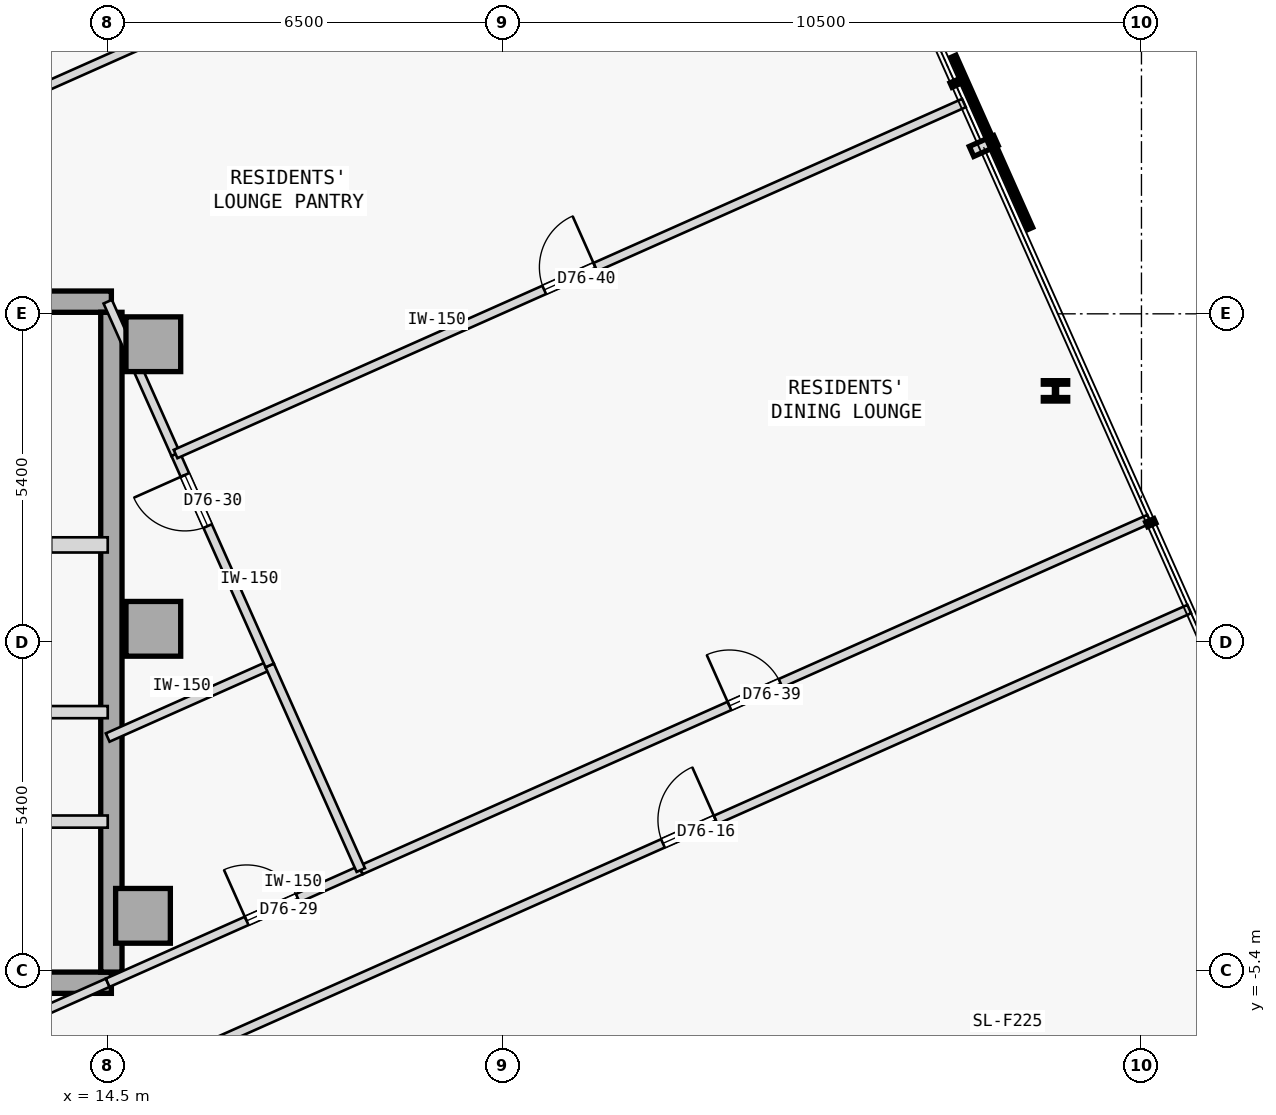
"""IFC4 building model, lengths in metres.
Left out: names, types, materials, properties, quantities, classifications, styles, units other than length and angle.
Written with IfcOpenShell. Run it as: python <this file> out.ifc"""

import sys

from ifc_helpers import new_model, si_unit, direction, frame, frame_2d, origin, origin_2d, place, context, subcontext, project, spatial, rectangle, i_section, extrude, element, fill, save


model = new_model("IFC4")
c1 = context("Model", 3, precision=1e-05, world=origin(), true_north=direction((0.0, 1.0)))
c2 = subcontext(c1, "Body", "Model", "MODEL_VIEW")
j1 = project(units=[si_unit("LENGTHUNIT", "METRE"), si_unit("PLANEANGLEUNIT", "RADIAN")], contexts=[c1])
p1 = place(None, origin())
s1 = spatial("IfcSite", under=j1, at=p1, CompositionType="ELEMENT")
p2 = place(p1, origin())
s2 = spatial("IfcBuilding", under=s1, at=p2, CompositionType="ELEMENT")
p3 = place(p2, frame((0.0, 0.0, 285.25)))
s3 = spatial("IfcBuildingStorey", under=s2, at=p3, CompositionType="ELEMENT", Elevation=285.25)
for number, where, z_axis, x_axis in (
    (1, (15.25, 4.9, 0.0), (0.0, 0.0, 1.0), (1.0, 0.0, 0.0)),
    (2, (15.25, 0.22, 0.0), (0.0, 0.0, 1.0), (1.0, 0.0, 0.0)),
    (3, (15.08, -4.5, 0.0), (0.0, 0.0, 1.0), (1.0, 0.0, 0.0)),
):
    element("IfcColumn", number, at=place(p3, frame(where, z_axis=z_axis, x_axis=x_axis)), inside=s3, PredefinedType="COLUMN", context=c2, shape_type="SweptSolid", body=[
        extrude(rectangle(XDim=0.9, YDim=0.9, at=origin_2d()), origin(), (0.0, 0.0, 1.0), 3.35),
    ])
p4 = place(p3, frame((3.15, 5.6, 0.0), z_axis=(0.0, 0.0, 1.0), x_axis=(1.0, 0.0, 0.0)))
e4 = element("IfcWall", 4, at=p4, inside=s3, PredefinedType="SHEAR", context=c2, shape_type="SweptSolid", body=[
    extrude(rectangle(XDim=11.41, YDim=0.35, at=frame_2d((5.705, 0.0))), origin(), (0.0, 0.0, 1.0), 3.125),
])
p5 = place(p3, frame((3.7, -5.6, 0.0), z_axis=(0.0, 0.0, 1.0), x_axis=(1.0, 0.0, 0.0)))
e5 = element("IfcWall", 5, at=p5, inside=s3, PredefinedType="SHEAR", context=c2, shape_type="SweptSolid", body=[
    extrude(rectangle(XDim=10.86, YDim=0.35, at=frame_2d((5.43, 0.0))), origin(), (0.0, 0.0, 1.0), 3.125),
])
p6 = place(p3, frame((14.56, -5.425, 0.0), z_axis=(0.0, 0.0, 1.0), x_axis=(0.0, 1.0, 0.0)))
e6 = element("IfcWall", 6, at=p6, inside=s3, PredefinedType="SHEAR", context=c2, shape_type="SweptSolid", body=[
    extrude(rectangle(XDim=10.85, YDim=0.35, at=frame_2d((5.425, 0.0))), origin(), (0.0, 0.0, 1.0), 3.125),
])
p7 = place(p3, frame((30.086, 4.133, 0.0), z_axis=(0.0, 0.0, 1.0), x_axis=(1.0, 0.0, 0.0)))
e7 = element("IfcColumn", 7, at=p7, inside=s3, PredefinedType="COLUMN", context=c2, shape_type="SweptSolid", body=[
    extrude(i_section(OverallWidth=0.401, OverallDepth=0.335, WebThickness=0.036, FlangeThickness=0.058, FilletRadius=0.015, at=origin_2d()), origin(), (0.0, 0.0, 1.0), 3.35),
])
p8 = place(p3, frame((10.9, 1.6, 0.0), z_axis=(0.0, 0.0, 1.0), x_axis=(1.0, 0.0, 0.0)))
e8 = element("IfcWall", 8, at=p8, inside=s3, PredefinedType="STANDARD", context=c2, shape_type="SweptSolid", body=[
    extrude(rectangle(XDim=3.6, YDim=0.25, at=frame_2d((1.8, 0.0))), origin(), (0.0, 0.0, 1.0), 3.125),
])
p9 = place(p8, frame((1.62, 0.0, 0.0)))
e9 = element("IfcOpeningElement", 9, at=p9, cuts=e8, PredefinedType="OPENING", context=c2, shape_type="SweptSolid", body=[
    extrude(rectangle(XDim=1.05, YDim=2.15, at=frame_2d((0.525, 1.075))), frame((0.0, 0.135, 0.0), z_axis=(0.0, -1.0, 0.0), x_axis=(1.0, 0.0, 0.0)), (0.0, 0.0, 1.0), 0.27),
])
p10 = place(p3, frame((11.55, -1.15, 0.0), z_axis=(0.0, 0.0, 1.0), x_axis=(1.0, 0.0, 0.0)))
e10 = element("IfcWall", 10, at=p10, inside=s3, PredefinedType="STANDARD", context=c2, shape_type="SweptSolid", body=[
    extrude(rectangle(XDim=2.95, YDim=0.2, at=frame_2d((1.475, 0.0))), origin(), (0.0, 0.0, 1.0), 3.125),
])
p11 = place(p10, frame((0.75, 0.0, 0.0)))
e11 = element("IfcOpeningElement", 11, at=p11, cuts=e10, PredefinedType="OPENING", context=c2, shape_type="SweptSolid", body=[
    extrude(rectangle(XDim=1.05, YDim=2.18, at=frame_2d((0.525, 1.09))), frame((0.0, 0.11, 0.0), z_axis=(0.0, -1.0, 0.0), x_axis=(1.0, 0.0, 0.0)), (0.0, 0.0, 1.0), 0.22),
])
p12 = place(p3, frame((3.7, -2.95, 0.0), z_axis=(0.0, 0.0, 1.0), x_axis=(1.0, 0.0, 0.0)))
e12 = element("IfcWall", 12, at=p12, inside=s3, PredefinedType="STANDARD", context=c2, shape_type="SweptSolid", body=[
    extrude(rectangle(XDim=10.8, YDim=0.2, at=frame_2d((5.4, 0.0))), origin(), (0.0, 0.0, 1.0), 3.125),
])
p13 = place(p12, frame((0.53, 0.0, 0.0)))
e13 = element("IfcOpeningElement", 13, at=p13, cuts=e12, PredefinedType="OPENING", context=c2, shape_type="SweptSolid", body=[
    extrude(rectangle(XDim=1.1, YDim=2.15, at=frame_2d((0.55, 1.075))), frame((0.0, 0.11, 0.0), z_axis=(0.0, -1.0, 0.0), x_axis=(1.0, 0.0, 0.0)), (0.0, 0.0, 1.0), 0.22),
])
p14 = place(p12, frame((6.02, 0.0, 0.0)))
e14 = element("IfcOpeningElement", 14, at=p14, cuts=e12, PredefinedType="OPENING", context=c2, shape_type="SweptSolid", body=[
    extrude(rectangle(XDim=0.92, YDim=2.15, at=frame_2d((0.46, 1.075))), frame((0.0, 0.11, 0.0), z_axis=(0.0, -1.0, 0.0), x_axis=(1.0, 0.0, 0.0)), (0.0, 0.0, 1.0), 0.22),
])
p15 = place(p3, frame((15.843, -6.776, 0.0), z_axis=(0.0, 0.0, 1.0), x_axis=(0.913541183414, 0.406746243015, 0.0)))
e15 = element("IfcWall", 15, at=p15, inside=s3, PredefinedType="PARTITIONING", context=c2, shape_type="SweptSolid", body=[
    extrude(rectangle(XDim=17.999, YDim=0.15, at=frame_2d((9.0, 0.0))), origin(), (0.0, 0.0, 1.0), 3.125),
])
p16 = place(p15, frame((8.524, 0.0, 0.0)))
e16 = element("IfcOpeningElement", 16, at=p16, cuts=e15, PredefinedType="OPENING", context=c2, shape_type="SweptSolid", body=[
    extrude(rectangle(XDim=0.95, YDim=2.15, at=frame_2d((0.475, 1.075))), frame((0.0, 0.085, 0.0), z_axis=(0.0, -1.0, 0.0), x_axis=(1.0, 0.0, 0.0)), (0.0, 0.0, 1.0), 0.17),
])
p17 = place(p3, frame((7.588, -8.677, 0.0), z_axis=(0.0, 0.0, 1.0), x_axis=(0.913555880467, 0.406713232221, 0.0)))
e17 = element("IfcWall", 17, at=p17, inside=s3, PredefinedType="PARTITIONING", context=c2, shape_type="SweptSolid", body=[
    extrude(rectangle(XDim=7.566, YDim=0.15, at=frame_2d((3.783, 0.0))), origin(), (0.0, 0.0, 1.0), 3.125),
])
p18 = place(p17, frame((1.205, 0.0, 0.0)))
e18 = element("IfcOpeningElement", 18, at=p18, cuts=e17, PredefinedType="OPENING", context=c2, shape_type="SweptSolid", body=[
    extrude(rectangle(XDim=0.92, YDim=2.15, at=frame_2d((0.46, 1.075))), frame((0.0, 0.085, 0.0), z_axis=(0.0, -1.0, 0.0), x_axis=(1.0, 0.0, 0.0)), (0.0, 0.0, 1.0), 0.17),
])
p19 = place(p3, frame((14.5, -5.6, 0.0), z_axis=(0.0, 0.0, 1.0), x_axis=(0.913550607208, 0.406725076766, 0.0)))
e19 = element("IfcWall", 19, at=p19, inside=s3, PredefinedType="PARTITIONING", context=c2, shape_type="SweptSolid", body=[
    extrude(rectangle(XDim=4.556, YDim=0.15, at=frame_2d((2.278, 0.0))), origin(), (0.0, 0.0, 1.0), 3.125),
])
p20 = place(p19, frame((2.501, 0.0, 0.0)))
e20 = element("IfcOpeningElement", 20, at=p20, cuts=e19, PredefinedType="OPENING", context=c2, shape_type="SweptSolid", body=[
    extrude(rectangle(XDim=0.92, YDim=2.15, at=frame_2d((0.46, 1.075))), frame((0.0, 0.085, 0.0), z_axis=(0.0, -1.0, 0.0), x_axis=(1.0, 0.0, 0.0)), (0.0, 0.0, 1.0), 0.17),
])
p21 = place(p3, frame((18.662, -3.747, 0.0), z_axis=(0.0, 0.0, 1.0), x_axis=(0.913544622417, 0.406738519018, 0.0)))
e21 = element("IfcWall", 21, at=p21, inside=s3, PredefinedType="PARTITIONING", context=c2, shape_type="SweptSolid", body=[
    extrude(rectangle(XDim=14.192, YDim=0.15, at=frame_2d((7.096, 0.0))), origin(), (0.0, 0.0, 1.0), 3.125),
])
p22 = place(p21, frame((6.636, 0.0, 0.0)))
e22 = element("IfcOpeningElement", 22, at=p22, cuts=e21, PredefinedType="OPENING", context=c2, shape_type="SweptSolid", body=[
    extrude(rectangle(XDim=0.92, YDim=2.15, at=frame_2d((0.46, 1.075))), frame((0.0, 0.085, 0.0), z_axis=(0.0, -1.0, 0.0), x_axis=(1.0, 0.0, 0.0)), (0.0, 0.0, 1.0), 0.17),
])
p23 = place(p3, frame((14.5, -1.568, 0.0), z_axis=(0.0, 0.0, 1.0), x_axis=(0.91354204122, 0.4067443164, 0.0)))
e23 = element("IfcWall", 23, at=p23, inside=s3, PredefinedType="PARTITIONING", context=c2, shape_type="SweptSolid", body=[
    extrude(rectangle(XDim=2.916, YDim=0.15, at=frame_2d((1.458, 0.0))), origin(), (0.0, 0.0, 1.0), 3.125),
])
p24 = place(p3, frame((18.662, -3.747, 0.0), z_axis=(0.0, 0.0, 1.0), x_axis=(-0.406740920471, 0.913543553212, 0.0)))
e24 = element("IfcWall", 24, at=p24, inside=s3, PredefinedType="PARTITIONING", context=c2, shape_type="SweptSolid", body=[
    extrude(rectangle(XDim=3.684, YDim=0.15, at=frame_2d((1.842, 0.0))), origin(), (0.0, 0.0, 1.0), 3.125),
])
p25 = place(p3, frame((17.163, -0.382, 0.0), z_axis=(0.0, 0.0, 1.0), x_axis=(-0.406727752939, 0.913549415735, 0.0)))
e25 = element("IfcWall", 25, at=p25, inside=s3, PredefinedType="PARTITIONING", context=c2, shape_type="SweptSolid", body=[
    extrude(rectangle(XDim=3.805, YDim=0.15, at=frame_2d((1.902, 0.0))), origin(), (0.0, 0.0, 1.0), 3.125),
])
p26 = place(p25, frame((2.508, 0.0, 0.0)))
e26 = element("IfcOpeningElement", 26, at=p26, cuts=e25, PredefinedType="OPENING", context=c2, shape_type="SweptSolid", body=[
    extrude(rectangle(XDim=0.92, YDim=2.15, at=frame_2d((0.46, 1.075))), frame((0.0, 0.085, 0.0), z_axis=(0.0, -1.0, 0.0), x_axis=(1.0, 0.0, 0.0)), (0.0, 0.0, 1.0), 0.17),
])
p27 = place(p3, frame((15.616, 3.094, 0.0), z_axis=(0.0, 0.0, 1.0), x_axis=(-0.406782551453, 0.913525016534, 0.0)))
e27 = element("IfcWall", 27, at=p27, inside=s3, PredefinedType="PARTITIONING", context=c2, shape_type="SweptSolid", body=[
    extrude(rectangle(XDim=2.743, YDim=0.15, at=frame_2d((1.372, 0.0))), origin(), (0.0, 0.0, 1.0), 3.125),
])
p28 = place(p3, frame((15.616, 3.094, 0.0), z_axis=(0.0, 0.0, 1.0), x_axis=(0.913551014388, 0.406724162191, 0.0)))
e28 = element("IfcWall", 28, at=p28, inside=s3, PredefinedType="PARTITIONING", context=c2, shape_type="SweptSolid", body=[
    extrude(rectangle(XDim=14.192, YDim=0.15, at=frame_2d((7.096, 0.0))), origin(), (0.0, 0.0, 1.0), 3.125),
])
p29 = place(p28, frame((6.636, 0.0, 0.0)))
e29 = element("IfcOpeningElement", 29, at=p29, cuts=e28, PredefinedType="OPENING", context=c2, shape_type="SweptSolid", body=[
    extrude(rectangle(XDim=0.92, YDim=2.15, at=frame_2d((0.46, 1.075))), frame((0.0, 0.085, 0.0), z_axis=(0.0, -1.0, 0.0), x_axis=(1.0, 0.0, 0.0)), (0.0, 0.0, 1.0), 0.17),
])
p30 = place(p3, frame((13.018, 8.93, 0.0), z_axis=(0.0, 0.0, 1.0), x_axis=(0.913551014388, 0.406724162191, 0.0)))
e30 = element("IfcWall", 30, at=p30, inside=s3, PredefinedType="PARTITIONING", context=c2, shape_type="SweptSolid", body=[
    extrude(rectangle(XDim=14.192, YDim=0.15, at=frame_2d((7.096, 0.0))), origin(), (0.0, 0.0, 1.0), 3.125),
])
p31 = place(p30, frame((6.636, 0.0, 0.0)))
e31 = element("IfcOpeningElement", 31, at=p31, cuts=e30, PredefinedType="OPENING", context=c2, shape_type="SweptSolid", body=[
    extrude(rectangle(XDim=0.92, YDim=2.15, at=frame_2d((0.46, 1.075))), frame((0.0, 0.085, 0.0), z_axis=(0.0, -1.0, 0.0), x_axis=(1.0, 0.0, 0.0)), (0.0, 0.0, 1.0), 0.17),
])
p32 = place(p16, origin())
e32 = element("IfcDoor", 32, at=p32, inside=s3, OperationType="SINGLE_SWING_RIGHT", PredefinedType="DOOR", context=c2, shape_type="SweptSolid", body=[
    extrude(rectangle(XDim=0.95, YDim=2.15, at=frame_2d((0.475, 1.075))), frame((0.0, 0.025, 0.0), z_axis=(0.0, -1.0, 0.0), x_axis=(1.0, 0.0, 0.0)), (0.0, 0.0, 1.0), 0.05),
])
fill(e16, e32)
p33 = place(p20, origin())
e33 = element("IfcDoor", 33, at=p33, inside=s3, OperationType="SINGLE_SWING_LEFT", PredefinedType="DOOR", context=c2, shape_type="SweptSolid", body=[
    extrude(rectangle(XDim=0.92, YDim=2.15, at=frame_2d((0.46, 1.075))), frame((0.0, 0.025, 0.0), z_axis=(0.0, -1.0, 0.0), x_axis=(1.0, 0.0, 0.0)), (0.0, 0.0, 1.0), 0.05),
])
fill(e20, e33)
p34 = place(p26, origin())
e34 = element("IfcDoor", 34, at=p34, inside=s3, OperationType="SINGLE_SWING_RIGHT", PredefinedType="DOOR", context=c2, shape_type="SweptSolid", body=[
    extrude(rectangle(XDim=0.92, YDim=2.15, at=frame_2d((0.46, 1.075))), frame((0.0, 0.025, 0.0), z_axis=(0.0, -1.0, 0.0), x_axis=(1.0, 0.0, 0.0)), (0.0, 0.0, 1.0), 0.05),
])
fill(e26, e34)
p35 = place(p22, origin())
e35 = element("IfcDoor", 35, at=p35, inside=s3, OperationType="SINGLE_SWING_LEFT", PredefinedType="DOOR", context=c2, shape_type="SweptSolid", body=[
    extrude(rectangle(XDim=0.92, YDim=2.15, at=frame_2d((0.46, 1.075))), frame((0.0, 0.025, 0.0), z_axis=(0.0, -1.0, 0.0), x_axis=(1.0, 0.0, 0.0)), (0.0, 0.0, 1.0), 0.05),
])
fill(e22, e35)
p36 = place(p29, origin())
e36 = element("IfcDoor", 36, at=p36, inside=s3, OperationType="SINGLE_SWING_RIGHT", PredefinedType="DOOR", context=c2, shape_type="SweptSolid", body=[
    extrude(rectangle(XDim=0.92, YDim=2.15, at=frame_2d((0.46, 1.075))), frame((0.0, 0.025, 0.0), z_axis=(0.0, -1.0, 0.0), x_axis=(1.0, 0.0, 0.0)), (0.0, 0.0, 1.0), 0.05),
])
fill(e29, e36)
save(model, sys.argv[1])
